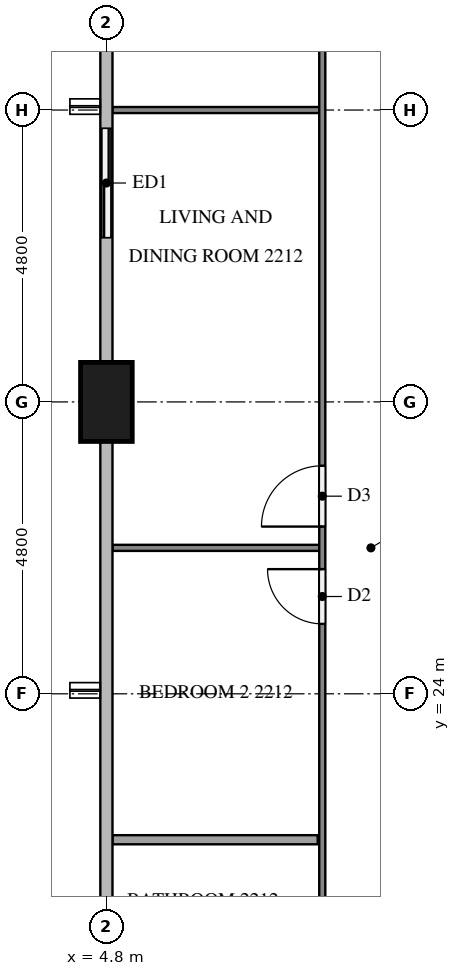
"""IFC4 building model, lengths in metres.
Left out: names, types, materials, properties, quantities, classifications, styles, units other than length and angle.
Written with IfcOpenShell. Run it as: python <this file> out.ifc"""

import sys

from ifc_helpers import new_model, si_unit, direction, frame, frame_2d, origin, origin_2d, place, context, subcontext, project, spatial, rectangle, extrude, element, fill, save


model = new_model("IFC4")
c1 = context("Model", 3, precision=1e-05, world=origin(), true_north=direction((0.0, 1.0)))
c2 = subcontext(c1, "Body", "Model", "MODEL_VIEW")
j1 = project(units=[si_unit("LENGTHUNIT", "METRE"), si_unit("PLANEANGLEUNIT", "RADIAN")], contexts=[c1])
p1 = place(None, origin())
s1 = spatial("IfcSite", under=j1, at=p1, CompositionType="ELEMENT")
p2 = place(p1, origin())
s2 = spatial("IfcBuilding", under=s1, at=p2, CompositionType="ELEMENT")
p3 = place(p2, frame((0.0, 0.0, 89.2)))
s3 = spatial("IfcBuildingStorey", under=s2, at=p3, CompositionType="ELEMENT", Elevation=89.2)
p4 = place(p3, frame((4.8, 28.8, 0.0), z_axis=(0.0, 0.0, 1.0), x_axis=(0.0, 1.0, 0.0)))
e1 = element("IfcColumn", 1, at=p4, inside=s3, PredefinedType="COLUMN", context=c2, shape_type="SweptSolid", body=[
    extrude(rectangle(XDim=1.3, YDim=0.85, at=origin_2d()), origin(), (0.0, 0.0, 1.0), 3.2),
])
p5 = place(p3, frame((4.8, 33.6, 0.0), z_axis=(0.0, 0.0, 1.0), x_axis=(0.0, -1.0, 0.0)))
e2 = element("IfcWall", 2, at=p5, inside=s3, PredefinedType="SOLIDWALL", context=c2, shape_type="SweptSolid", body=[
    extrude(rectangle(XDim=2.4, YDim=0.15, at=frame_2d((1.2, 0.0))), origin(), (0.0, 0.0, 1.0), 3.2),
])
p6 = place(p5, frame((0.3, 0.0, 0.0)))
e3 = element("IfcOpeningElement", 3, at=p6, cuts=e2, PredefinedType="OPENING", context=c2, shape_type="SweptSolid", body=[
    extrude(rectangle(XDim=1.8, YDim=2.4, at=frame_2d((0.9, 1.2))), frame((0.0, 0.085, 0.0), z_axis=(0.0, -1.0, 0.0), x_axis=(1.0, 0.0, 0.0)), (0.0, 0.0, 1.0), 0.17),
])
for number, where, z_axis, x_axis in (
    (4, (8.3, 33.6, 0.0), (0.0, 0.0, 1.0), (-1.0, 0.0, 0.0)),
    (5, (8.3, 26.4, 0.0), (0.0, 0.0, 1.0), (-1.0, 0.0, 0.0)),
):
    element("IfcWall", number, at=place(p3, frame(where, z_axis=z_axis, x_axis=x_axis)), inside=s3, PredefinedType="PARTITIONING", context=c2, shape_type="SweptSolid", body=[
        extrude(rectangle(XDim=3.4, YDim=0.1, at=frame_2d((1.7, 0.0))), origin(), (0.0, 0.0, 1.0), 3.2),
    ])
p7 = place(p3, frame((8.275, 21.6, 0.0), z_axis=(0.0, 0.0, 1.0), x_axis=(-1.0, 0.0, 0.0)))
e6 = element("IfcWall", 6, at=p7, inside=s3, PredefinedType="PARTITIONING", context=c2, shape_type="SweptSolid", body=[
    extrude(rectangle(XDim=3.375, YDim=0.15, at=frame_2d((1.688, 0.0))), origin(), (0.0, 0.0, 1.0), 3.2),
])
p8 = place(p3, frame((8.35, 15.1, 0.0), z_axis=(0.0, 0.0, 1.0), x_axis=(0.0, 1.0, 0.0)))
e7 = element("IfcWall", 7, at=p8, inside=s3, PredefinedType="PARTITIONING", context=c2, shape_type="SweptSolid", body=[
    extrude(rectangle(XDim=22.6, YDim=0.1, at=frame_2d((11.3, 0.0))), origin(), (0.0, 0.0, 1.0), 3.2),
])
p9 = place(p8, frame((21.4, 0.0, 0.0)))
e8 = element("IfcOpeningElement", 8, at=p9, cuts=e7, PredefinedType="OPENING", context=c2, shape_type="SweptSolid", body=[
    extrude(rectangle(XDim=0.9, YDim=2.1, at=frame_2d((0.45, 1.05))), frame((0.0, 0.06, 0.0), z_axis=(0.0, -1.0, 0.0), x_axis=(1.0, 0.0, 0.0)), (0.0, 0.0, 1.0), 0.12),
])
p10 = place(p8, frame((11.65, 0.0, 0.0)))
e9 = element("IfcOpeningElement", 9, at=p10, cuts=e7, PredefinedType="OPENING", context=c2, shape_type="SweptSolid", body=[
    extrude(rectangle(XDim=1.0, YDim=2.1, at=frame_2d((0.5, 1.05))), frame((0.0, 0.06, 0.0), z_axis=(0.0, -1.0, 0.0), x_axis=(1.0, 0.0, 0.0)), (0.0, 0.0, 1.0), 0.12),
])
p11 = place(p8, frame((10.05, 0.0, 0.0)))
e10 = element("IfcOpeningElement", 10, at=p11, cuts=e7, PredefinedType="OPENING", context=c2, shape_type="SweptSolid", body=[
    extrude(rectangle(XDim=0.9, YDim=2.1, at=frame_2d((0.45, 1.05))), frame((0.0, 0.06, 0.0), z_axis=(0.0, -1.0, 0.0), x_axis=(1.0, 0.0, 0.0)), (0.0, 0.0, 1.0), 0.12),
])
p12 = place(p8, frame((4.45, 0.0, 0.0)))
e11 = element("IfcOpeningElement", 11, at=p12, cuts=e7, PredefinedType="OPENING", context=c2, shape_type="SweptSolid", body=[
    extrude(rectangle(XDim=0.9, YDim=2.1, at=frame_2d((0.45, 1.05))), frame((0.0, 0.06, 0.0), z_axis=(0.0, -1.0, 0.0), x_axis=(1.0, 0.0, 0.0)), (0.0, 0.0, 1.0), 0.12),
])
p13 = place(p8, frame((2.85, 0.0, 0.0)))
e12 = element("IfcOpeningElement", 12, at=p13, cuts=e7, PredefinedType="OPENING", context=c2, shape_type="SweptSolid", body=[
    extrude(rectangle(XDim=0.9, YDim=2.1, at=frame_2d((0.45, 1.05))), frame((0.0, 0.06, 0.0), z_axis=(0.0, -1.0, 0.0), x_axis=(1.0, 0.0, 0.0)), (0.0, 0.0, 1.0), 0.12),
])
p14 = place(p8, frame((0.3, 0.0, 0.0)))
e13 = element("IfcOpeningElement", 13, at=p14, cuts=e7, PredefinedType="OPENING", context=c2, shape_type="SweptSolid", body=[
    extrude(rectangle(XDim=0.8, YDim=2.1, at=frame_2d((0.4, 1.05))), frame((0.0, 0.06, 0.0), z_axis=(0.0, -1.0, 0.0), x_axis=(1.0, 0.0, 0.0)), (0.0, 0.0, 1.0), 0.12),
])
p15 = place(p6, origin())
e14 = element("IfcDoor", 14, at=p15, inside=s3, OperationType="SLIDING_TO_LEFT", PredefinedType="DOOR", context=c2, shape_type="SweptSolid", body=[
    extrude(rectangle(XDim=1.8, YDim=2.4, at=frame_2d((0.9, 1.2))), frame((0.0, 0.025, 0.0), z_axis=(0.0, -1.0, 0.0), x_axis=(1.0, 0.0, 0.0)), (0.0, 0.0, 1.0), 0.05),
])
fill(e3, e14)
p16 = place(p10, origin())
e15 = element("IfcDoor", 15, at=p16, inside=s3, OperationType="SINGLE_SWING_LEFT", PredefinedType="DOOR", context=c2, shape_type="SweptSolid", body=[
    extrude(rectangle(XDim=1.0, YDim=2.1, at=frame_2d((0.5, 1.05))), frame((0.0, 0.025, 0.0), z_axis=(0.0, -1.0, 0.0), x_axis=(1.0, 0.0, 0.0)), (0.0, 0.0, 1.0), 0.05),
])
fill(e9, e15)
p17 = place(p11, origin())
e16 = element("IfcDoor", 16, at=p17, inside=s3, OperationType="SINGLE_SWING_RIGHT", PredefinedType="DOOR", context=c2, shape_type="SweptSolid", body=[
    extrude(rectangle(XDim=0.9, YDim=2.1, at=frame_2d((0.45, 1.05))), frame((0.0, 0.025, 0.0), z_axis=(0.0, -1.0, 0.0), x_axis=(1.0, 0.0, 0.0)), (0.0, 0.0, 1.0), 0.05),
])
fill(e10, e16)
save(model, sys.argv[1])
